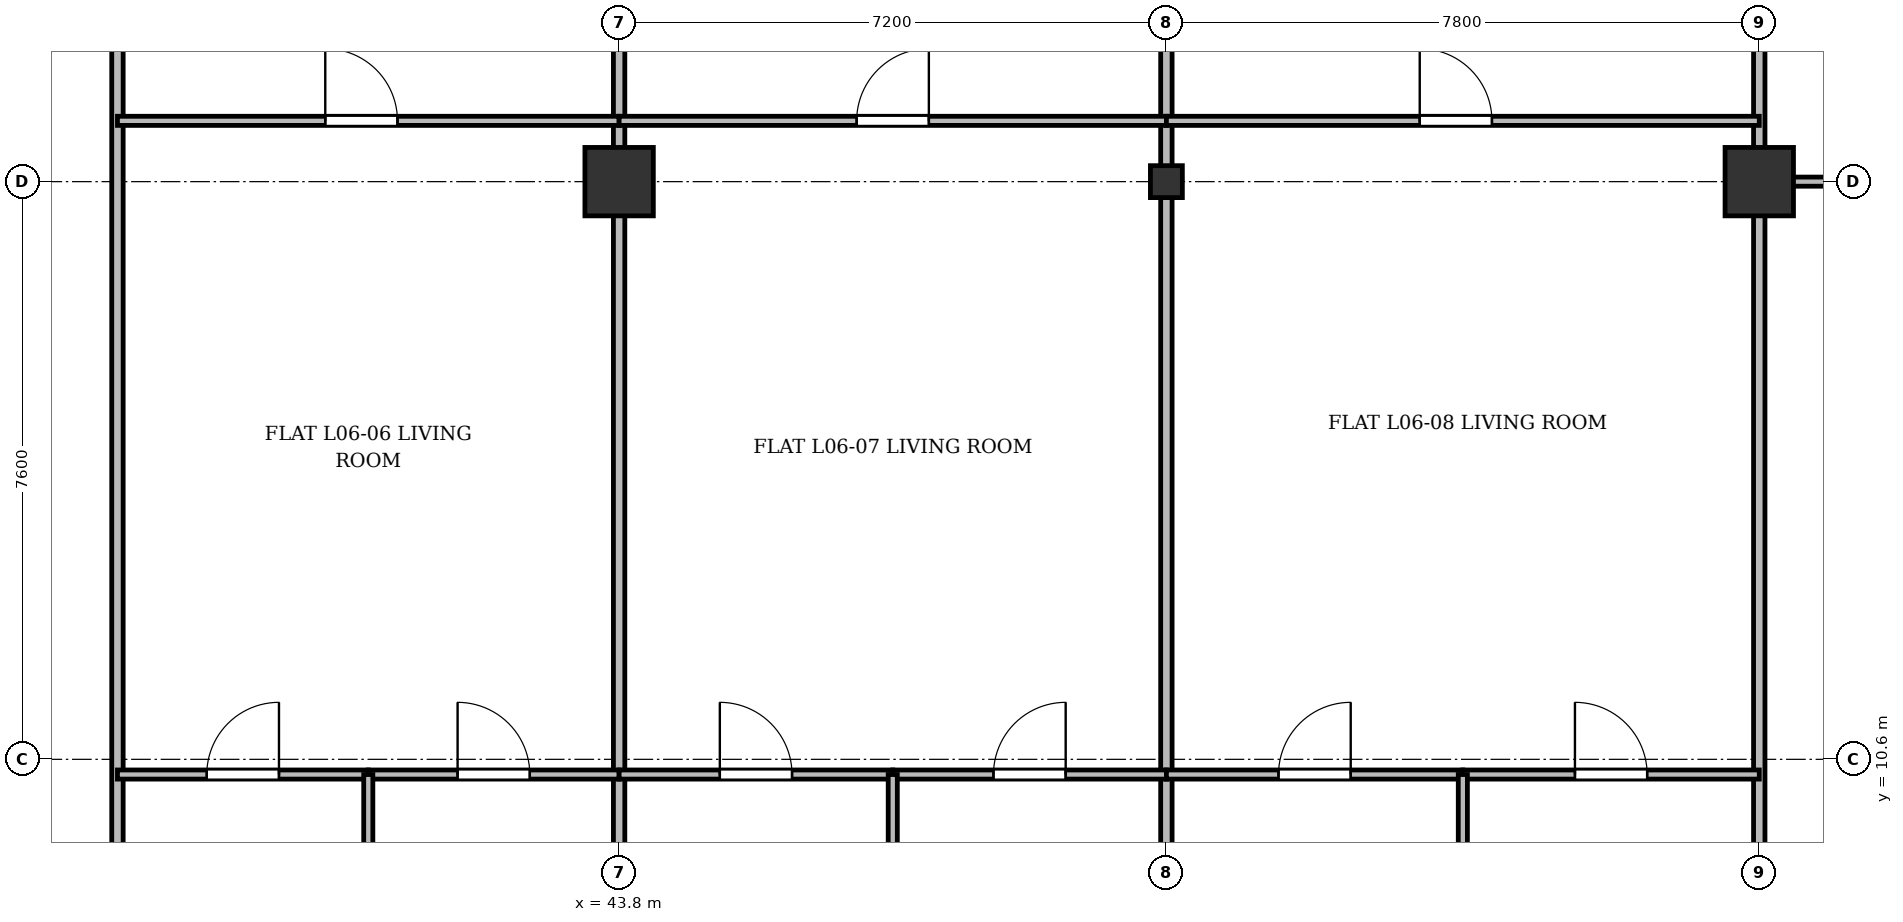
"""IFC4 building model, lengths in metres.
Left out: names, types, materials, properties, quantities, classifications, styles, units other than length and angle.
Written with IfcOpenShell. Run it as: python <this file> out.ifc"""

import sys

from ifc_helpers import new_model, si_unit, direction, frame, frame_2d, origin, origin_2d, place, context, subcontext, project, spatial, rectangle, i_section, extrude, source, transform, mapped, element, fill, save


model = new_model("IFC4")
c1 = context("Model", 3, precision=1e-05, world=origin(), true_north=direction((0.0, 1.0)))
c2 = subcontext(c1, "Body", "Model", "MODEL_VIEW")
j1 = project(units=[si_unit("LENGTHUNIT", "METRE"), si_unit("PLANEANGLEUNIT", "RADIAN")], contexts=[c1])
p1 = place(None, origin())
s1 = spatial("IfcSite", under=j1, at=p1, CompositionType="ELEMENT")
p2 = place(p1, origin())
s2 = spatial("IfcBuilding", under=s1, at=p2, CompositionType="ELEMENT")
p3 = place(p2, frame((0.0, 0.0, 27.1)))
s3 = spatial("IfcBuildingStorey", under=s2, at=p3, CompositionType="ELEMENT", Elevation=27.1)
m1 = source(origin(), c2, "Body", "SweptSolid", [
    extrude(rectangle(XDim=0.9, YDim=0.9, at=origin_2d()), origin(), (0.0, 0.0, 1.0), 3.6),
])
p4 = place(p3, frame((43.8, 18.2, 0.0), z_axis=(0.0, 0.0, 1.0), x_axis=(1.0, 0.0, 0.0)))
e1 = element("IfcColumn", 1, at=p4, inside=s3, PredefinedType="COLUMN", context=c2, shape_type="MappedRepresentation", body=[
    mapped(m1, transform((0.0, 0.0, 0.0), x_axis=(1.0, 0.0, 0.0), y_axis=(0.0, 1.0, 0.0), z_axis=(0.0, 0.0, 1.0), scale=1.0)),
])
m2 = source(origin(), c2, "Body", "SweptSolid", [
    extrude(i_section(OverallWidth=0.42, OverallDepth=0.42, WebThickness=0.026, FlangeThickness=0.04, at=origin_2d()), origin(), (0.0, 0.0, 1.0), 3.6),
])
p5 = place(p3, frame((51.0, 18.2, 0.0), z_axis=(0.0, 0.0, 1.0), x_axis=(1.0, 0.0, 0.0)))
e2 = element("IfcColumn", 2, at=p5, inside=s3, PredefinedType="COLUMN", context=c2, shape_type="MappedRepresentation", body=[
    mapped(m2, transform((0.0, 0.0, 0.0), x_axis=(1.0, 0.0, 0.0), y_axis=(0.0, 1.0, 0.0), z_axis=(0.0, 0.0, 1.0), scale=1.0)),
])
p6 = place(p3, frame((58.8, 18.2, 0.0), z_axis=(0.0, 0.0, 1.0), x_axis=(1.0, 0.0, 0.0)))
e3 = element("IfcColumn", 3, at=p6, inside=s3, PredefinedType="COLUMN", context=c2, shape_type="MappedRepresentation", body=[
    mapped(m1, transform((0.0, 0.0, 0.0), x_axis=(1.0, 0.0, 0.0), y_axis=(0.0, 1.0, 0.0), z_axis=(0.0, 0.0, 1.0), scale=1.0)),
])
p7 = place(p3, frame((37.2, 3.145, 0.0), z_axis=(0.0, 0.0, 1.0), x_axis=(0.0, 1.0, 0.0)))
e4 = element("IfcWall", 4, at=p7, inside=s3, PredefinedType="PARTITIONING", context=c2, shape_type="SweptSolid", body=[
    extrude(rectangle(XDim=24.455, YDim=0.15, at=frame_2d((12.228, 0.0))), origin(), (0.0, 0.0, 1.0), 2.69),
])
for number, where, z_axis, x_axis in (
    (5, (43.8, 3.145, 0.0), (0.0, 0.0, 1.0), (0.0, 1.0, 0.0)),
    (6, (51.0, 3.145, 0.0), (0.0, 0.0, 1.0), (0.0, 1.0, 0.0)),
    (7, (58.8, 3.145, 0.0), (0.0, 0.0, 1.0), (0.0, 1.0, 0.0)),
):
    element("IfcWall", number, at=place(p3, frame(where, z_axis=z_axis, x_axis=x_axis)), inside=s3, PredefinedType="PARTITIONING", context=c2, shape_type="SweptSolid", body=[
        extrude(rectangle(XDim=24.455, YDim=0.15, at=frame_2d((12.228, 0.0))), origin(), (0.0, 0.0, 1.0), 2.752),
    ])
p8 = place(p3, frame((37.2, 19.0, 0.0), z_axis=(0.0, 0.0, 1.0), x_axis=(1.0, 0.0, 0.0)))
e8 = element("IfcWall", 8, at=p8, inside=s3, PredefinedType="PARTITIONING", context=c2, shape_type="SweptSolid", body=[
    extrude(rectangle(XDim=6.6, YDim=0.12, at=frame_2d((3.3, 0.0))), origin(), (0.0, 0.0, 1.0), 2.752),
])
p9 = place(p8, frame((2.734, 0.0, 0.0)))
e9 = element("IfcOpeningElement", 9, at=p9, cuts=e8, PredefinedType="OPENING", context=c2, shape_type="SweptSolid", body=[
    extrude(rectangle(XDim=0.95, YDim=2.15, at=frame_2d((0.475, 1.075))), frame((0.0, 0.07, 0.0), z_axis=(0.0, -1.0, 0.0), x_axis=(1.0, 0.0, 0.0)), (0.0, 0.0, 1.0), 0.14),
])
p10 = place(p3, frame((37.2, 10.4, 0.0), z_axis=(0.0, 0.0, 1.0), x_axis=(1.0, 0.0, 0.0)))
e10 = element("IfcWall", 10, at=p10, inside=s3, PredefinedType="PARTITIONING", context=c2, shape_type="SweptSolid", body=[
    extrude(rectangle(XDim=3.3, YDim=0.12, at=frame_2d((1.65, 0.0))), origin(), (0.0, 0.0, 1.0), 3.34),
])
p11 = place(p10, frame((1.175, 0.0, 0.0)))
e11 = element("IfcOpeningElement", 11, at=p11, cuts=e10, PredefinedType="OPENING", context=c2, shape_type="SweptSolid", body=[
    extrude(rectangle(XDim=0.95, YDim=2.15, at=frame_2d((0.475, 1.075))), frame((0.0, 0.07, 0.0), z_axis=(0.0, -1.0, 0.0), x_axis=(1.0, 0.0, 0.0)), (0.0, 0.0, 1.0), 0.14),
])
p12 = place(p3, frame((40.5, 10.4, 0.0), z_axis=(0.0, 0.0, 1.0), x_axis=(1.0, 0.0, 0.0)))
e12 = element("IfcWall", 12, at=p12, inside=s3, PredefinedType="PARTITIONING", context=c2, shape_type="SweptSolid", body=[
    extrude(rectangle(XDim=3.3, YDim=0.12, at=frame_2d((1.65, 0.0))), origin(), (0.0, 0.0, 1.0), 2.752),
])
p13 = place(p12, frame((1.175, 0.0, 0.0)))
e13 = element("IfcOpeningElement", 13, at=p13, cuts=e12, PredefinedType="OPENING", context=c2, shape_type="SweptSolid", body=[
    extrude(rectangle(XDim=0.95, YDim=2.15, at=frame_2d((0.475, 1.075))), frame((0.0, 0.07, 0.0), z_axis=(0.0, -1.0, 0.0), x_axis=(1.0, 0.0, 0.0)), (0.0, 0.0, 1.0), 0.14),
])
p14 = place(p3, frame((40.5, 3.145, 0.0), z_axis=(0.0, 0.0, 1.0), x_axis=(0.0, 1.0, 0.0)))
e14 = element("IfcWall", 14, at=p14, inside=s3, PredefinedType="PARTITIONING", context=c2, shape_type="SweptSolid", body=[
    extrude(rectangle(XDim=7.255, YDim=0.12, at=frame_2d((3.627, 0.0))), origin(), (0.0, 0.0, 1.0), 2.69),
])
p15 = place(p3, frame((43.8, 19.0, 0.0), z_axis=(0.0, 0.0, 1.0), x_axis=(1.0, 0.0, 0.0)))
e15 = element("IfcWall", 15, at=p15, inside=s3, PredefinedType="PARTITIONING", context=c2, shape_type="SweptSolid", body=[
    extrude(rectangle(XDim=7.2, YDim=0.12, at=frame_2d((3.6, 0.0))), origin(), (0.0, 0.0, 1.0), 2.752),
])
p16 = place(p15, frame((3.125, 0.0, 0.0)))
e16 = element("IfcOpeningElement", 16, at=p16, cuts=e15, PredefinedType="OPENING", context=c2, shape_type="SweptSolid", body=[
    extrude(rectangle(XDim=0.95, YDim=2.15, at=frame_2d((0.475, 1.075))), frame((0.0, 0.07, 0.0), z_axis=(0.0, -1.0, 0.0), x_axis=(1.0, 0.0, 0.0)), (0.0, 0.0, 1.0), 0.14),
])
p17 = place(p3, frame((43.8, 10.4, 0.0), z_axis=(0.0, 0.0, 1.0), x_axis=(1.0, 0.0, 0.0)))
e17 = element("IfcWall", 17, at=p17, inside=s3, PredefinedType="PARTITIONING", context=c2, shape_type="SweptSolid", body=[
    extrude(rectangle(XDim=3.6, YDim=0.12, at=frame_2d((1.8, 0.0))), origin(), (0.0, 0.0, 1.0), 2.752),
])
p18 = place(p17, frame((1.325, 0.0, 0.0)))
e18 = element("IfcOpeningElement", 18, at=p18, cuts=e17, PredefinedType="OPENING", context=c2, shape_type="SweptSolid", body=[
    extrude(rectangle(XDim=0.95, YDim=2.15, at=frame_2d((0.475, 1.075))), frame((0.0, 0.07, 0.0), z_axis=(0.0, -1.0, 0.0), x_axis=(1.0, 0.0, 0.0)), (0.0, 0.0, 1.0), 0.14),
])
p19 = place(p3, frame((47.4, 10.4, 0.0), z_axis=(0.0, 0.0, 1.0), x_axis=(1.0, 0.0, 0.0)))
e19 = element("IfcWall", 19, at=p19, inside=s3, PredefinedType="PARTITIONING", context=c2, shape_type="SweptSolid", body=[
    extrude(rectangle(XDim=3.6, YDim=0.12, at=frame_2d((1.8, 0.0))), origin(), (0.0, 0.0, 1.0), 2.752),
])
p20 = place(p19, frame((1.325, 0.0, 0.0)))
e20 = element("IfcOpeningElement", 20, at=p20, cuts=e19, PredefinedType="OPENING", context=c2, shape_type="SweptSolid", body=[
    extrude(rectangle(XDim=0.95, YDim=2.15, at=frame_2d((0.475, 1.075))), frame((0.0, 0.07, 0.0), z_axis=(0.0, -1.0, 0.0), x_axis=(1.0, 0.0, 0.0)), (0.0, 0.0, 1.0), 0.14),
])
p21 = place(p3, frame((47.4, 3.145, 0.0), z_axis=(0.0, 0.0, 1.0), x_axis=(0.0, 1.0, 0.0)))
e21 = element("IfcWall", 21, at=p21, inside=s3, PredefinedType="PARTITIONING", context=c2, shape_type="SweptSolid", body=[
    extrude(rectangle(XDim=7.255, YDim=0.12, at=frame_2d((3.627, 0.0))), origin(), (0.0, 0.0, 1.0), 2.69),
])
p22 = place(p3, frame((51.0, 19.0, 0.0), z_axis=(0.0, 0.0, 1.0), x_axis=(1.0, 0.0, 0.0)))
e22 = element("IfcWall", 22, at=p22, inside=s3, PredefinedType="PARTITIONING", context=c2, shape_type="SweptSolid", body=[
    extrude(rectangle(XDim=7.8, YDim=0.12, at=frame_2d((3.9, 0.0))), origin(), (0.0, 0.0, 1.0), 2.752),
])
p23 = place(p22, frame((3.333, 0.0, 0.0)))
e23 = element("IfcOpeningElement", 23, at=p23, cuts=e22, PredefinedType="OPENING", context=c2, shape_type="SweptSolid", body=[
    extrude(rectangle(XDim=0.95, YDim=2.15, at=frame_2d((0.475, 1.075))), frame((0.0, 0.07, 0.0), z_axis=(0.0, -1.0, 0.0), x_axis=(1.0, 0.0, 0.0)), (0.0, 0.0, 1.0), 0.14),
])
p24 = place(p3, frame((51.0, 10.4, 0.0), z_axis=(0.0, 0.0, 1.0), x_axis=(1.0, 0.0, 0.0)))
e24 = element("IfcWall", 24, at=p24, inside=s3, PredefinedType="PARTITIONING", context=c2, shape_type="SweptSolid", body=[
    extrude(rectangle(XDim=3.9, YDim=0.12, at=frame_2d((1.95, 0.0))), origin(), (0.0, 0.0, 1.0), 2.752),
])
p25 = place(p24, frame((1.475, 0.0, 0.0)))
e25 = element("IfcOpeningElement", 25, at=p25, cuts=e24, PredefinedType="OPENING", context=c2, shape_type="SweptSolid", body=[
    extrude(rectangle(XDim=0.95, YDim=2.15, at=frame_2d((0.475, 1.075))), frame((0.0, 0.07, 0.0), z_axis=(0.0, -1.0, 0.0), x_axis=(1.0, 0.0, 0.0)), (0.0, 0.0, 1.0), 0.14),
])
p26 = place(p3, frame((54.9, 10.4, 0.0), z_axis=(0.0, 0.0, 1.0), x_axis=(1.0, 0.0, 0.0)))
e26 = element("IfcWall", 26, at=p26, inside=s3, PredefinedType="PARTITIONING", context=c2, shape_type="SweptSolid", body=[
    extrude(rectangle(XDim=3.9, YDim=0.12, at=frame_2d((1.95, 0.0))), origin(), (0.0, 0.0, 1.0), 2.752),
])
p27 = place(p26, frame((1.475, 0.0, 0.0)))
e27 = element("IfcOpeningElement", 27, at=p27, cuts=e26, PredefinedType="OPENING", context=c2, shape_type="SweptSolid", body=[
    extrude(rectangle(XDim=0.95, YDim=2.15, at=frame_2d((0.475, 1.075))), frame((0.0, 0.07, 0.0), z_axis=(0.0, -1.0, 0.0), x_axis=(1.0, 0.0, 0.0)), (0.0, 0.0, 1.0), 0.14),
])
p28 = place(p3, frame((54.9, 3.145, 0.0), z_axis=(0.0, 0.0, 1.0), x_axis=(0.0, 1.0, 0.0)))
e28 = element("IfcWall", 28, at=p28, inside=s3, PredefinedType="PARTITIONING", context=c2, shape_type="SweptSolid", body=[
    extrude(rectangle(XDim=7.255, YDim=0.12, at=frame_2d((3.627, 0.0))), origin(), (0.0, 0.0, 1.0), 2.69),
])
p29 = place(p3, frame((58.8, 18.2, 0.0), z_axis=(0.0, 0.0, 1.0), x_axis=(1.0, 0.0, 0.0)))
e29 = element("IfcWall", 29, at=p29, inside=s3, PredefinedType="PARTITIONING", context=c2, shape_type="SweptSolid", body=[
    extrude(rectangle(XDim=6.8, YDim=0.12, at=frame_2d((3.4, 0.0))), origin(), (0.0, 0.0, 1.0), 2.69),
])
p30 = place(p29, frame((2.925, 0.0, 0.0)))
e30 = element("IfcOpeningElement", 30, at=p30, cuts=e29, PredefinedType="OPENING", context=c2, shape_type="SweptSolid", body=[
    extrude(rectangle(XDim=0.95, YDim=2.15, at=frame_2d((0.475, 1.075))), frame((0.0, 0.07, 0.0), z_axis=(0.0, -1.0, 0.0), x_axis=(1.0, 0.0, 0.0)), (0.0, 0.0, 1.0), 0.14),
])
m3 = source(origin(), c2, "Body", "SweptSolid", [
    extrude(rectangle(XDim=0.95, YDim=2.15, at=frame_2d((0.475, 1.075))), frame((0.0, 0.025, 0.0), z_axis=(0.0, -1.0, 0.0), x_axis=(1.0, 0.0, 0.0)), (0.0, 0.0, 1.0), 0.05),
])
p31 = place(p9, origin())
e31 = element("IfcDoor", 31, at=p31, inside=s3, OperationType="SINGLE_SWING_LEFT", PredefinedType="DOOR", context=c2, shape_type="MappedRepresentation", body=[
    mapped(m3, transform((0.0, 0.0, 0.0), x_axis=(1.0, 0.0, 0.0), y_axis=(0.0, 1.0, 0.0), z_axis=(0.0, 0.0, 1.0), scale=1.0)),
])
fill(e9, e31)
p32 = place(p11, origin())
e32 = element("IfcDoor", 32, at=p32, inside=s3, OperationType="SINGLE_SWING_RIGHT", PredefinedType="DOOR", context=c2, shape_type="MappedRepresentation", body=[
    mapped(m3, transform((0.0, 0.0, 0.0), x_axis=(1.0, 0.0, 0.0), y_axis=(0.0, 1.0, 0.0), z_axis=(0.0, 0.0, 1.0), scale=1.0)),
])
fill(e11, e32)
p33 = place(p13, origin())
e33 = element("IfcDoor", 33, at=p33, inside=s3, OperationType="SINGLE_SWING_LEFT", PredefinedType="DOOR", context=c2, shape_type="MappedRepresentation", body=[
    mapped(m3, transform((0.0, 0.0, 0.0), x_axis=(1.0, 0.0, 0.0), y_axis=(0.0, 1.0, 0.0), z_axis=(0.0, 0.0, 1.0), scale=1.0)),
])
fill(e13, e33)
p34 = place(p16, origin())
e34 = element("IfcDoor", 34, at=p34, inside=s3, OperationType="SINGLE_SWING_RIGHT", PredefinedType="DOOR", context=c2, shape_type="MappedRepresentation", body=[
    mapped(m3, transform((0.0, 0.0, 0.0), x_axis=(1.0, 0.0, 0.0), y_axis=(0.0, 1.0, 0.0), z_axis=(0.0, 0.0, 1.0), scale=1.0)),
])
fill(e16, e34)
p35 = place(p18, origin())
e35 = element("IfcDoor", 35, at=p35, inside=s3, OperationType="SINGLE_SWING_LEFT", PredefinedType="DOOR", context=c2, shape_type="MappedRepresentation", body=[
    mapped(m3, transform((0.0, 0.0, 0.0), x_axis=(1.0, 0.0, 0.0), y_axis=(0.0, 1.0, 0.0), z_axis=(0.0, 0.0, 1.0), scale=1.0)),
])
fill(e18, e35)
p36 = place(p20, origin())
e36 = element("IfcDoor", 36, at=p36, inside=s3, OperationType="SINGLE_SWING_RIGHT", PredefinedType="DOOR", context=c2, shape_type="MappedRepresentation", body=[
    mapped(m3, transform((0.0, 0.0, 0.0), x_axis=(1.0, 0.0, 0.0), y_axis=(0.0, 1.0, 0.0), z_axis=(0.0, 0.0, 1.0), scale=1.0)),
])
fill(e20, e36)
p37 = place(p23, origin())
e37 = element("IfcDoor", 37, at=p37, inside=s3, OperationType="SINGLE_SWING_LEFT", PredefinedType="DOOR", context=c2, shape_type="MappedRepresentation", body=[
    mapped(m3, transform((0.0, 0.0, 0.0), x_axis=(1.0, 0.0, 0.0), y_axis=(0.0, 1.0, 0.0), z_axis=(0.0, 0.0, 1.0), scale=1.0)),
])
fill(e23, e37)
p38 = place(p25, origin())
e38 = element("IfcDoor", 38, at=p38, inside=s3, OperationType="SINGLE_SWING_RIGHT", PredefinedType="DOOR", context=c2, shape_type="MappedRepresentation", body=[
    mapped(m3, transform((0.0, 0.0, 0.0), x_axis=(1.0, 0.0, 0.0), y_axis=(0.0, 1.0, 0.0), z_axis=(0.0, 0.0, 1.0), scale=1.0)),
])
fill(e25, e38)
p39 = place(p27, origin())
e39 = element("IfcDoor", 39, at=p39, inside=s3, OperationType="SINGLE_SWING_LEFT", PredefinedType="DOOR", context=c2, shape_type="MappedRepresentation", body=[
    mapped(m3, transform((0.0, 0.0, 0.0), x_axis=(1.0, 0.0, 0.0), y_axis=(0.0, 1.0, 0.0), z_axis=(0.0, 0.0, 1.0), scale=1.0)),
])
fill(e27, e39)
save(model, sys.argv[1])
